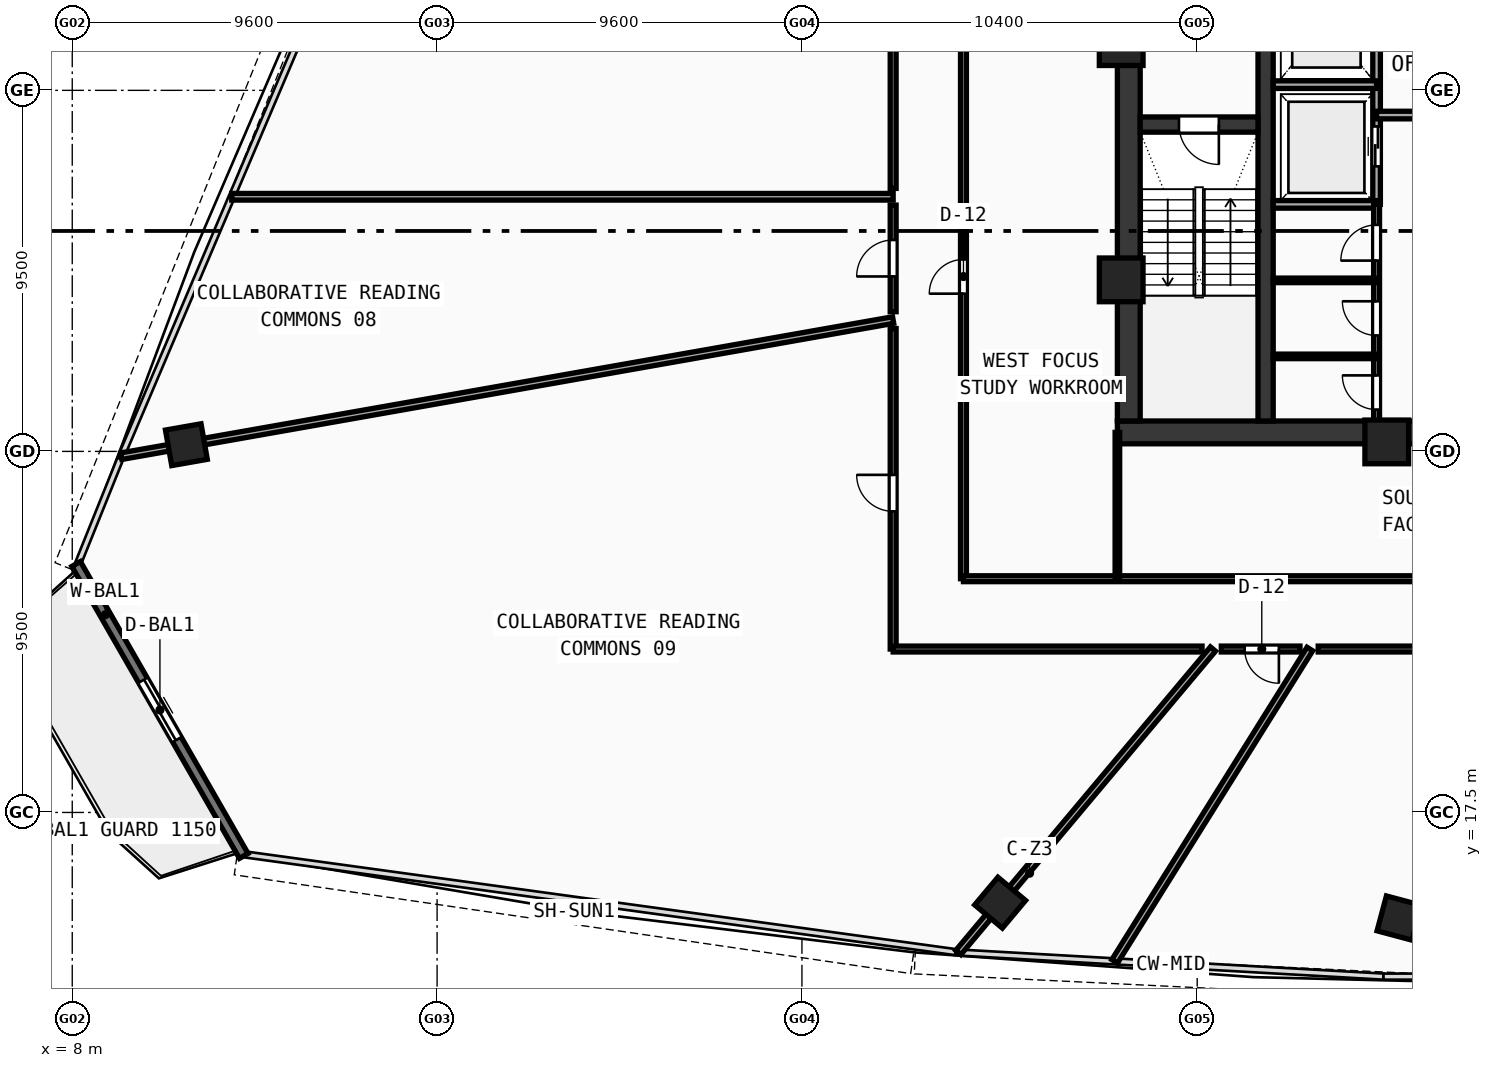
"""IFC4 building model, lengths in metres.
Left out: names, types, materials, properties, quantities, classifications, styles, units other than length and angle.
Written with IfcOpenShell. Run it as: python <this file> out.ifc"""

import sys

from ifc_helpers import new_model, si_unit, direction, frame, frame_2d, origin, origin_with_axes, origin_2d, place, context, subcontext, project, spatial, rectangle, hollow_rectangle, extrude, source, transform, mapped, element, fill, save


model = new_model("IFC4")
c1 = context("Model", 3, precision=1e-05, world=origin(), true_north=direction((0.0, 1.0)))
c2 = subcontext(c1, "Body", "Model", "MODEL_VIEW")
j1 = project(units=[si_unit("LENGTHUNIT", "METRE"), si_unit("PLANEANGLEUNIT", "RADIAN")], contexts=[c1])
p1 = place(None, origin())
s1 = spatial("IfcSite", under=j1, at=p1, CompositionType="ELEMENT")
p2 = place(p1, origin())
s2 = spatial("IfcBuilding", under=s1, at=p2, CompositionType="ELEMENT")
p3 = place(p2, frame((0.0, 0.0, 140.87)))
s3 = spatial("IfcBuildingStorey", under=s2, at=p3, CompositionType="ELEMENT", Elevation=140.87)
p4 = place(p3, frame((35.5, 27.5, 0.0), z_axis=(0.0, 0.0, 1.0), x_axis=(1.0, 0.0, 0.0)))
e1 = element("IfcWall", 1, at=p4, inside=s3, PredefinedType="SHEAR", context=c2, shape_type="SweptSolid", body=[
    extrude(rectangle(XDim=25.0, YDim=0.6, at=frame_2d((12.5, 0.0))), origin(), (0.0, 0.0, 1.0), 3.42),
])
p5 = place(p3, frame((35.8, 27.8, 0.0), z_axis=(0.0, 0.0, 1.0), x_axis=(0.0, 1.0, 0.0)))
e2 = element("IfcWall", 2, at=p5, inside=s3, PredefinedType="SHEAR", context=c2, shape_type="SweptSolid", body=[
    extrude(rectangle(XDim=12.1, YDim=0.6, at=frame_2d((6.05, 0.0))), origin(), (0.0, 0.0, 1.0), 3.42),
])
p6 = place(p3, frame((39.4, 27.8, 0.0), z_axis=(0.0, 0.0, 1.0), x_axis=(0.0, 1.0, 0.0)))
e3 = element("IfcWall", 3, at=p6, inside=s3, PredefinedType="SHEAR", context=c2, shape_type="SweptSolid", body=[
    extrude(rectangle(XDim=12.1, YDim=0.4, at=frame_2d((6.05, 0.0))), origin(), (0.0, 0.0, 1.0), 3.42),
])
p7 = place(p6, frame((9.95, 0.0, 0.0)))
e4 = element("IfcOpeningElement", 4, at=p7, cuts=e3, PredefinedType="OPENING", context=c2, shape_type="SweptSolid", body=[
    extrude(rectangle(XDim=1.1, YDim=2.1, at=frame_2d((0.55, 1.05))), frame((0.0, 0.21, 0.0), z_axis=(0.0, -1.0, 0.0), x_axis=(1.0, 0.0, 0.0)), (0.0, 0.0, 1.0), 0.42),
])
p8 = place(p3, frame((36.1, 35.6, 0.0), z_axis=(0.0, 0.0, 1.0), x_axis=(1.0, 0.0, 0.0)))
e5 = element("IfcWall", 5, at=p8, inside=s3, PredefinedType="SHEAR", context=c2, shape_type="SweptSolid", body=[
    extrude(rectangle(XDim=3.1, YDim=0.4, at=frame_2d((1.55, 0.0))), origin(), (0.0, 0.0, 1.0), 3.42),
])
p9 = place(p8, frame((1.02, 0.0, 0.0)))
e6 = element("IfcOpeningElement", 6, at=p9, cuts=e5, PredefinedType="OPENING", context=c2, shape_type="SweptSolid", body=[
    extrude(rectangle(XDim=1.05, YDim=2.1, at=frame_2d((0.525, 1.05))), frame((0.0, 0.21, 0.0), z_axis=(0.0, -1.0, 0.0), x_axis=(1.0, 0.0, 0.0)), (0.0, 0.0, 1.0), 0.42),
])
m1 = source(origin(), c2, "Body", "SweptSolid", [
    extrude(hollow_rectangle(XDim=1.15, YDim=1.15, WallThickness=0.048, at=origin_2d()), origin(), (0.0, 0.0, 1.0), 3.68),
])
for number, where, z_axis, x_axis in (
    (7, (42.588, 27.25, -0.26), (0.0, 0.0, 1.0), (1.0, 0.0, 0.0)),
    (8, (35.6, 37.729, -0.26), (0.0, 0.0, 1.0), (1.0, 0.0, 0.0)),
    (9, (35.6, 31.513, -0.26), (0.0, 0.0, 1.0), (1.0, 0.0, 0.0)),
):
    element("IfcColumn", number, at=place(p3, frame(where, z_axis=z_axis, x_axis=x_axis)), inside=s3, PredefinedType="COLUMN", context=c2, shape_type="MappedRepresentation", body=[
        mapped(m1, transform((0.0, 0.0, 0.0), scale=1.0)),
    ])
m2 = source(origin(), c2, "Body", "SweptSolid", [
    extrude(hollow_rectangle(XDim=0.95, YDim=0.95, WallThickness=0.04, at=origin_2d()), origin(), (0.0, 0.0, 1.0), 3.68),
])
for number, where, z_axis, x_axis in (
    (10, (32.415, 15.126, -0.26), (0.0, 0.0, 1.0), (0.766, -0.643, 0.0)),
    (11, (42.915, 14.722, -0.26), (0.0, 0.0, 1.0), (0.966, -0.259, 0.0)),
    (12, (11.003, 27.177, -0.26), (0.0, 0.0, 1.0), (0.174, -0.985, 0.0)),
):
    element("IfcColumn", number, at=place(p3, frame(where, z_axis=z_axis, x_axis=x_axis)), inside=s3, PredefinedType="COLUMN", context=c2, shape_type="MappedRepresentation", body=[
        mapped(m2, transform((0.0, 0.0, 0.0), scale=1.0)),
    ])
p10 = place(p3, frame((8.102, 24.038, 0.0), z_axis=(0.0, 0.0, 1.0), x_axis=(0.497915888941, -0.867225326856, 0.0)))
e13 = element("IfcWall", 13, at=p10, inside=s3, PredefinedType="STANDARD", context=c2, shape_type="SweptSolid", body=[
    extrude(rectangle(XDim=8.858, YDim=0.26, at=frame_2d((4.429, 0.0))), origin(), (0.0, 0.0, 1.0), 3.42),
])
p11 = place(p10, frame((3.529, 0.0, 0.0)))
e14 = element("IfcOpeningElement", 14, at=p11, cuts=e13, PredefinedType="OPENING", context=c2, shape_type="SweptSolid", body=[
    extrude(rectangle(XDim=1.8, YDim=2.15, at=frame_2d((0.9, 1.075))), frame((0.0, 0.14, 0.0), z_axis=(0.0, -1.0, 0.0), x_axis=(1.0, 0.0, 0.0)), (0.0, 0.0, 1.0), 0.28),
])
p12 = place(p3, frame((42.32, 33.5, 0.0), z_axis=(0.0, 0.0, 1.0), x_axis=(0.0, 1.0, 0.0)))
e15 = element("IfcWall", 15, at=p12, inside=s3, PredefinedType="SOLIDWALL", context=c2, shape_type="SweptSolid", body=[
    extrude(rectangle(XDim=6.45, YDim=0.2, at=frame_2d((3.225, 0.0))), origin(), (0.0, 0.0, 1.0), 3.42),
])
p13 = place(p12, frame((1.0, 0.0, 0.0)))
e16 = element("IfcOpeningElement", 16, at=p13, cuts=e15, PredefinedType="OPENING", context=c2, shape_type="SweptSolid", body=[
    extrude(rectangle(XDim=1.05, YDim=2.1, at=frame_2d((0.525, 1.05))), frame((0.0, 0.11, 0.0), z_axis=(0.0, -1.0, 0.0), x_axis=(1.0, 0.0, 0.0)), (0.0, 0.0, 1.0), 0.22),
])
for number, where, z_axis, x_axis in (
    (17, (39.6, 36.65, 0.0), (0.0, 0.0, 1.0), (1.0, 0.0, 0.0)),
    (18, (39.6, 33.5, 0.0), (0.0, 0.0, 1.0), (1.0, 0.0, 0.0)),
):
    element("IfcWall", number, at=place(p3, frame(where, z_axis=z_axis, x_axis=x_axis)), inside=s3, PredefinedType="SOLIDWALL", context=c2, shape_type="SweptSolid", body=[
        extrude(rectangle(XDim=2.72, YDim=0.2, at=frame_2d((1.36, 0.0))), origin(), (0.0, 0.0, 1.0), 3.42),
    ])
p14 = place(p3, frame((42.32, 35.85, 0.0), z_axis=(0.0, 0.0, 1.0), x_axis=(1.0, 0.0, 0.0)))
e19 = element("IfcWall", 19, at=p14, inside=s3, PredefinedType="SOLIDWALL", context=c2, shape_type="SweptSolid", body=[
    extrude(rectangle(XDim=4.73, YDim=0.2, at=frame_2d((2.365, 0.0))), origin(), (0.0, 0.0, 1.0), 3.42),
])
p15 = place(p14, frame((1.8, 0.0, 0.0)))
e20 = element("IfcOpeningElement", 20, at=p15, cuts=e19, PredefinedType="OPENING", context=c2, shape_type="SweptSolid", body=[
    extrude(rectangle(XDim=0.9, YDim=2.1, at=frame_2d((0.45, 1.05))), frame((0.0, 0.11, 0.0), z_axis=(0.0, -1.0, 0.0), x_axis=(1.0, 0.0, 0.0)), (0.0, 0.0, 1.0), 0.22),
])
p16 = place(p3, frame((42.32, 27.6, 0.0), z_axis=(0.0, 0.0, 1.0), x_axis=(0.0, 1.0, 0.0)))
e21 = element("IfcWall", 21, at=p16, inside=s3, PredefinedType="PARTITIONING", context=c2, shape_type="SweptSolid", body=[
    extrude(rectangle(XDim=5.9, YDim=0.155, at=frame_2d((2.95, 0.0))), origin(), (0.0, 0.0, 1.0), 3.42),
])
p17 = place(p16, frame((0.5, 0.0, 0.0)))
e22 = element("IfcOpeningElement", 22, at=p17, cuts=e21, PredefinedType="OPENING", context=c2, shape_type="SweptSolid", body=[
    extrude(rectangle(XDim=0.9, YDim=2.1, at=frame_2d((0.45, 1.05))), frame((0.0, 0.087, 0.0), z_axis=(0.0, -1.0, 0.0), x_axis=(1.0, 0.0, 0.0)), (0.0, 0.0, 1.0), 0.175),
])
p18 = place(p16, frame((2.45, 0.0, 0.0)))
e23 = element("IfcOpeningElement", 23, at=p18, cuts=e21, PredefinedType="OPENING", context=c2, shape_type="SweptSolid", body=[
    extrude(rectangle(XDim=0.9, YDim=2.1, at=frame_2d((0.45, 1.05))), frame((0.0, 0.087, 0.0), z_axis=(0.0, -1.0, 0.0), x_axis=(1.0, 0.0, 0.0)), (0.0, 0.0, 1.0), 0.175),
])
p19 = place(p16, frame((4.42, 0.0, 0.0)))
e24 = element("IfcOpeningElement", 24, at=p19, cuts=e21, PredefinedType="OPENING", context=c2, shape_type="SweptSolid", body=[
    extrude(rectangle(XDim=0.94, YDim=2.1, at=frame_2d((0.47, 1.05))), frame((0.0, 0.087, 0.0), z_axis=(0.0, -1.0, 0.0), x_axis=(1.0, 0.0, 0.0)), (0.0, 0.0, 1.0), 0.175),
])
for number, where, z_axis, x_axis in (
    (25, (39.6, 29.5, 0.0), (0.0, 0.0, 1.0), (1.0, 0.0, 0.0)),
    (26, (39.6, 31.5, 0.0), (0.0, 0.0, 1.0), (1.0, 0.0, 0.0)),
):
    element("IfcWall", number, at=place(p3, frame(where, z_axis=z_axis, x_axis=x_axis)), inside=s3, PredefinedType="PARTITIONING", context=c2, shape_type="SweptSolid", body=[
        extrude(rectangle(XDim=2.72, YDim=0.12, at=frame_2d((1.36, 0.0))), origin(), (0.0, 0.0, 1.0), 3.42),
    ])
p20 = place(p3, frame((31.45, 23.65, 0.0), z_axis=(0.0, 0.0, 1.0), x_axis=(0.0, 1.0, 0.0)))
e27 = element("IfcWall", 27, at=p20, inside=s3, PredefinedType="PARTITIONING", context=c2, shape_type="SweptSolid", body=[
    extrude(rectangle(XDim=16.6, YDim=0.155, at=frame_2d((8.3, 0.0))), origin(), (0.0, 0.0, 1.0), 2.77),
])
p21 = place(p20, frame((7.5, 0.0, 0.0)))
e28 = element("IfcOpeningElement", 28, at=p21, cuts=e27, PredefinedType="OPENING", context=c2, shape_type="SweptSolid", body=[
    extrude(rectangle(XDim=0.9, YDim=2.08, at=frame_2d((0.45, 1.04))), frame((0.0, 0.087, 0.0), z_axis=(0.0, -1.0, 0.0), x_axis=(1.0, 0.0, 0.0)), (0.0, 0.0, 1.0), 0.175),
])
p22 = place(p3, frame((31.45, 23.65, 0.0), z_axis=(0.0, 0.0, 1.0), x_axis=(1.0, 0.0, 0.0)))
e29 = element("IfcWall", 29, at=p22, inside=s3, PredefinedType="PARTITIONING", context=c2, shape_type="SweptSolid", body=[
    extrude(rectangle(XDim=33.1, YDim=0.155, at=frame_2d((16.55, 0.0))), origin(), (0.0, 0.0, 1.0), 2.77),
])
p23 = place(p22, frame((16.0, 0.0, 0.0)))
e30 = element("IfcOpeningElement", 30, at=p23, cuts=e29, PredefinedType="OPENING", context=c2, shape_type="SweptSolid", body=[
    extrude(rectangle(XDim=0.92, YDim=2.1, at=frame_2d((0.46, 1.05))), frame((0.0, 0.087, 0.0), z_axis=(0.0, -1.0, 0.0), x_axis=(1.0, 0.0, 0.0)), (0.0, 0.0, 1.0), 0.175),
])
p24 = place(p3, frame((35.5, 23.65, 0.0), z_axis=(0.0, 0.0, 1.0), x_axis=(0.0, 1.0, 0.0)))
e31 = element("IfcWall", 31, at=p24, inside=s3, PredefinedType="PARTITIONING", context=c2, shape_type="SweptSolid", body=[
    extrude(rectangle(XDim=3.85, YDim=0.12, at=frame_2d((1.925, 0.0))), origin(), (0.0, 0.0, 1.0), 3.02),
])
p25 = place(p3, frame((29.6, 33.7, 0.0), z_axis=(0.0, 0.0, 1.0), x_axis=(-1.0, 0.0, 0.0)))
e32 = element("IfcWall", 32, at=p25, inside=s3, PredefinedType="PARTITIONING", context=c2, shape_type="SweptSolid", body=[
    extrude(rectangle(XDim=17.403, YDim=0.175, at=frame_2d((8.702, 0.0))), origin(), (0.0, 0.0, 1.0), 2.77),
])
p26 = place(p3, frame((29.6, 30.456, 0.0), z_axis=(0.0, 0.0, 1.0), x_axis=(-0.984807623882, -0.173648909998, 0.0)))
e33 = element("IfcWall", 33, at=p26, inside=s3, PredefinedType="PARTITIONING", context=c2, shape_type="SweptSolid", body=[
    extrude(rectangle(XDim=20.622, YDim=0.175, at=frame_2d((10.311, 0.0))), origin(), (0.0, 0.0, 1.0), 2.77),
])
p27 = place(p3, frame((38.015, 21.8, 0.0), z_axis=(0.0, 0.0, 1.0), x_axis=(-0.642781677101, -0.76604942111, 0.0)))
e34 = element("IfcWall", 34, at=p27, inside=s3, PredefinedType="PARTITIONING", context=c2, shape_type="SweptSolid", body=[
    extrude(rectangle(XDim=10.424, YDim=0.175, at=frame_2d((5.212, 0.0))), origin(), (0.0, 0.0, 1.0), 2.77),
])
p28 = place(p3, frame((40.564, 21.8, 0.0), z_axis=(0.0, 0.0, 1.0), x_axis=(-0.529931002604, -0.848040761096, 0.0)))
e35 = element("IfcWall", 35, at=p28, inside=s3, PredefinedType="PARTITIONING", context=c2, shape_type="SweptSolid", body=[
    extrude(rectangle(XDim=9.691, YDim=0.175, at=frame_2d((4.845, 0.0))), origin(), (0.0, 0.0, 1.0), 2.77),
])
p29 = place(p3, frame((29.6, 21.8, 0.0), z_axis=(0.0, 0.0, 1.0), x_axis=(0.0, 1.0, 0.0)))
e36 = element("IfcWall", 36, at=p29, inside=s3, PredefinedType="PARTITIONING", context=c2, shape_type="SweptSolid", body=[
    extrude(rectangle(XDim=8.432, YDim=0.155, at=frame_2d((4.216, 0.0))), origin(), (0.0, 0.0, 1.0), 3.02),
])
p30 = place(p29, frame((3.623, 0.0, 0.0)))
e37 = element("IfcOpeningElement", 37, at=p30, cuts=e36, PredefinedType="OPENING", context=c2, shape_type="SweptSolid", body=[
    extrude(rectangle(XDim=0.96, YDim=2.12, at=frame_2d((0.48, 1.06))), frame((0.0, 0.087, 0.0), z_axis=(0.0, -1.0, 0.0), x_axis=(1.0, 0.0, 0.0)), (0.0, 0.0, 1.0), 0.175),
])
p31 = place(p3, frame((29.6, 30.675, 0.0), z_axis=(0.0, 0.0, 1.0), x_axis=(0.0, 1.0, 0.0)))
e38 = element("IfcWall", 38, at=p31, inside=s3, PredefinedType="PARTITIONING", context=c2, shape_type="SweptSolid", body=[
    extrude(rectangle(XDim=2.805, YDim=0.155, at=frame_2d((1.402, 0.0))), origin(), (0.0, 0.0, 1.0), 3.42),
])
p32 = place(p31, frame((0.927, 0.0, 0.0)))
e39 = element("IfcOpeningElement", 39, at=p32, cuts=e38, PredefinedType="OPENING", context=c2, shape_type="SweptSolid", body=[
    extrude(rectangle(XDim=0.96, YDim=2.12, at=frame_2d((0.48, 1.06))), frame((0.0, 0.087, 0.0), z_axis=(0.0, -1.0, 0.0), x_axis=(1.0, 0.0, 0.0)), (0.0, 0.0, 1.0), 0.175),
])
p33 = place(p3, frame((29.6, 33.92, 0.0), z_axis=(0.0, 0.0, 1.0), x_axis=(0.0, 1.0, 0.0)))
e40 = element("IfcWall", 40, at=p33, inside=s3, PredefinedType="PARTITIONING", context=c2, shape_type="SweptSolid", body=[
    extrude(rectangle(XDim=8.535, YDim=0.155, at=frame_2d((4.267, 0.0))), origin(), (0.0, 0.0, 1.0), 2.77),
])
p34 = place(p33, frame((3.792, 0.0, 0.0)))
e41 = element("IfcOpeningElement", 41, at=p34, cuts=e40, PredefinedType="OPENING", context=c2, shape_type="SweptSolid", body=[
    extrude(rectangle(XDim=0.96, YDim=2.12, at=frame_2d((0.48, 1.06))), frame((0.0, 0.087, 0.0), z_axis=(0.0, -1.0, 0.0), x_axis=(1.0, 0.0, 0.0)), (0.0, 0.0, 1.0), 0.175),
])
p35 = place(p3, frame((50.969, 21.8, 0.0), z_axis=(0.0, 0.0, 1.0), x_axis=(-1.0, 0.0, 0.0)))
e42 = element("IfcWall", 42, at=p35, inside=s3, PredefinedType="PARTITIONING", context=c2, shape_type="SweptSolid", body=[
    extrude(rectangle(XDim=10.185, YDim=0.155, at=frame_2d((5.092, 0.0))), origin(), (0.0, 0.0, 1.0), 2.77),
])
p36 = place(p35, frame((4.617, 0.0, 0.0)))
e43 = element("IfcOpeningElement", 43, at=p36, cuts=e42, PredefinedType="OPENING", context=c2, shape_type="SweptSolid", body=[
    extrude(rectangle(XDim=0.96, YDim=2.12, at=frame_2d((0.48, 1.06))), frame((0.0, 0.087, 0.0), z_axis=(0.0, -1.0, 0.0), x_axis=(1.0, 0.0, 0.0)), (0.0, 0.0, 1.0), 0.175),
])
p37 = place(p3, frame((40.305, 21.8, 0.0), z_axis=(0.0, 0.0, 1.0), x_axis=(-1.0, 0.0, 0.0)))
e44 = element("IfcWall", 44, at=p37, inside=s3, PredefinedType="PARTITIONING", context=c2, shape_type="SweptSolid", body=[
    extrude(rectangle(XDim=2.07, YDim=0.155, at=frame_2d((1.035, 0.0))), origin(), (0.0, 0.0, 1.0), 2.77),
])
p38 = place(p37, frame((0.555, 0.0, 0.0)))
e45 = element("IfcOpeningElement", 45, at=p38, cuts=e44, PredefinedType="OPENING", context=c2, shape_type="SweptSolid", body=[
    extrude(rectangle(XDim=0.9, YDim=2.08, at=frame_2d((0.45, 1.04))), frame((0.0, 0.087, 0.0), z_axis=(0.0, -1.0, 0.0), x_axis=(1.0, 0.0, 0.0)), (0.0, 0.0, 1.0), 0.175),
])
p39 = place(p3, frame((37.728, 21.8, 0.0), z_axis=(0.0, 0.0, 1.0), x_axis=(-1.0, 0.0, 0.0)))
e46 = element("IfcWall", 46, at=p39, inside=s3, PredefinedType="PARTITIONING", context=c2, shape_type="SweptSolid", body=[
    extrude(rectangle(XDim=8.127, YDim=0.155, at=frame_2d((4.064, 0.0))), origin(), (0.0, 0.0, 1.0), 3.02),
])
m3 = source(origin(), c2, "Body", "SweptSolid", [
    extrude(rectangle(XDim=1.8, YDim=2.15, at=frame_2d((0.9, 1.075))), frame((0.0, 0.025, 0.0), z_axis=(0.0, -1.0, 0.0), x_axis=(1.0, 0.0, 0.0)), (0.0, 0.0, 1.0), 0.05),
])
p40 = place(p11, origin_with_axes())
e47 = element("IfcDoor", 47, at=p40, inside=s3, OperationType="DOUBLE_DOOR_SLIDING", PredefinedType="DOOR", context=c2, shape_type="MappedRepresentation", body=[
    mapped(m3, transform((0.0, 0.0, 0.0), scale=1.0)),
])
fill(e14, e47)
m4 = source(origin(), c2, "Body", "SweptSolid", [
    extrude(rectangle(XDim=1.05, YDim=2.1, at=frame_2d((0.525, 1.05))), frame((0.0, 0.025, 0.0), z_axis=(0.0, -1.0, 0.0), x_axis=(1.0, 0.0, 0.0)), (0.0, 0.0, 1.0), 0.05),
])
p41 = place(p9, frame((1.05, 0.0, 0.0), z_axis=(0.0, 0.0, 1.0), x_axis=(-1.0, 0.0, 0.0)))
e48 = element("IfcDoor", 48, at=p41, inside=s3, OperationType="SINGLE_SWING_LEFT", PredefinedType="DOOR", context=c2, shape_type="MappedRepresentation", body=[
    mapped(m4, transform((0.0, 0.0, 0.0), scale=1.0)),
])
fill(e6, e48)
p42 = place(p13, origin_with_axes())
e49 = element("IfcDoor", 49, at=p42, inside=s3, OperationType="DOUBLE_DOOR_SLIDING", PredefinedType="DOOR", context=c2, shape_type="MappedRepresentation", body=[
    mapped(m4, transform((0.0, 0.0, 0.0), scale=1.0)),
])
fill(e16, e49)
m5 = source(origin(), c2, "Body", "SweptSolid", [
    extrude(rectangle(XDim=0.9, YDim=2.1, at=frame_2d((0.45, 1.05))), frame((0.0, 0.025, 0.0), z_axis=(0.0, -1.0, 0.0), x_axis=(1.0, 0.0, 0.0)), (0.0, 0.0, 1.0), 0.05),
])
p43 = place(p17, origin_with_axes())
e50 = element("IfcDoor", 50, at=p43, inside=s3, OperationType="SINGLE_SWING_RIGHT", PredefinedType="DOOR", context=c2, shape_type="MappedRepresentation", body=[
    mapped(m5, transform((0.0, 0.0, 0.0), scale=1.0)),
])
fill(e22, e50)
p44 = place(p18, origin_with_axes())
e51 = element("IfcDoor", 51, at=p44, inside=s3, OperationType="SINGLE_SWING_RIGHT", PredefinedType="DOOR", context=c2, shape_type="MappedRepresentation", body=[
    mapped(m5, transform((0.0, 0.0, 0.0), scale=1.0)),
])
fill(e23, e51)
m6 = source(origin(), c2, "Body", "SweptSolid", [
    extrude(rectangle(XDim=0.94, YDim=2.1, at=frame_2d((0.47, 1.05))), frame((0.0, 0.025, 0.0), z_axis=(0.0, -1.0, 0.0), x_axis=(1.0, 0.0, 0.0)), (0.0, 0.0, 1.0), 0.05),
])
p45 = place(p19, origin_with_axes())
e52 = element("IfcDoor", 52, at=p45, inside=s3, OperationType="SINGLE_SWING_LEFT", PredefinedType="DOOR", context=c2, shape_type="MappedRepresentation", body=[
    mapped(m6, transform((0.0, 0.0, 0.0), scale=1.0)),
])
fill(e24, e52)
m7 = source(origin(), c2, "Body", "SweptSolid", [
    extrude(rectangle(XDim=0.9, YDim=2.08, at=frame_2d((0.45, 1.04))), frame((0.0, 0.025, 0.0), z_axis=(0.0, -1.0, 0.0), x_axis=(1.0, 0.0, 0.0)), (0.0, 0.0, 1.0), 0.05),
])
p46 = place(p21, origin_with_axes())
e53 = element("IfcDoor", 53, at=p46, inside=s3, OperationType="SINGLE_SWING_LEFT", PredefinedType="DOOR", context=c2, shape_type="MappedRepresentation", body=[
    mapped(m7, transform((0.0, 0.0, 0.0), scale=1.0)),
])
fill(e28, e53)
m8 = source(origin(), c2, "Body", "SweptSolid", [
    extrude(rectangle(XDim=0.96, YDim=2.12, at=frame_2d((0.48, 1.06))), frame((0.0, 0.025, 0.0), z_axis=(0.0, -1.0, 0.0), x_axis=(1.0, 0.0, 0.0)), (0.0, 0.0, 1.0), 0.05),
])
p47 = place(p32, origin_with_axes())
e54 = element("IfcDoor", 54, at=p47, inside=s3, OperationType="SINGLE_SWING_LEFT", PredefinedType="DOOR", context=c2, shape_type="MappedRepresentation", body=[
    mapped(m8, transform((0.0, 0.0, 0.0), scale=1.0)),
])
fill(e39, e54)
p48 = place(p30, origin_with_axes())
e55 = element("IfcDoor", 55, at=p48, inside=s3, OperationType="SINGLE_SWING_RIGHT", PredefinedType="DOOR", context=c2, shape_type="MappedRepresentation", body=[
    mapped(m8, transform((0.0, 0.0, 0.0), scale=1.0)),
])
fill(e37, e55)
p49 = place(p38, origin_with_axes())
e56 = element("IfcDoor", 56, at=p49, inside=s3, OperationType="SINGLE_SWING_LEFT", PredefinedType="DOOR", context=c2, shape_type="MappedRepresentation", body=[
    mapped(m7, transform((0.0, 0.0, 0.0), scale=1.0)),
])
fill(e45, e56)
save(model, sys.argv[1])
